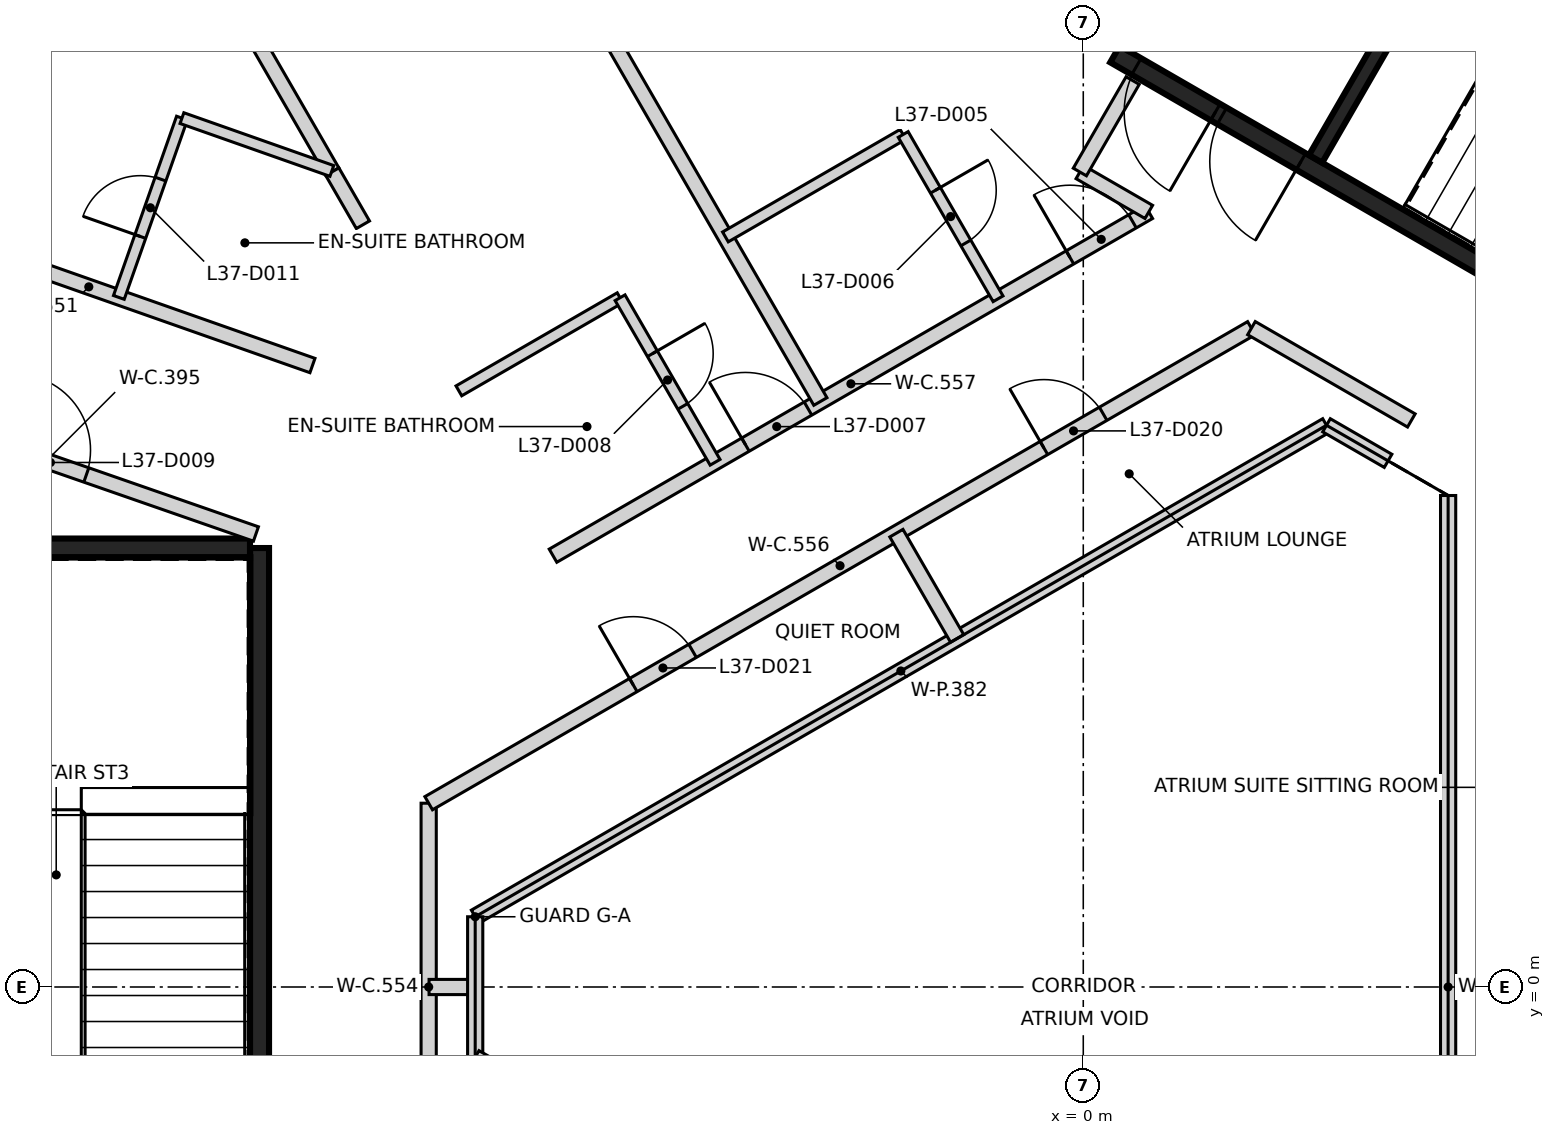
"""IFC4 building model, lengths in metres.
Left out: names, types, materials, properties, quantities, classifications, styles, units other than length and angle.
Written with IfcOpenShell. Run it as: python <this file> out.ifc"""

import sys

from ifc_helpers import new_model, si_unit, direction, frame, frame_2d, origin, place, context, subcontext, project, spatial, rectangle, extrude, element, fill, save


model = new_model("IFC4")
c1 = context("Model", 3, precision=1e-05, world=origin(), true_north=direction((0.0, 1.0)))
c2 = subcontext(c1, "Body", "Model", "MODEL_VIEW")
j1 = project(units=[si_unit("LENGTHUNIT", "METRE"), si_unit("PLANEANGLEUNIT", "RADIAN")], contexts=[c1])
p1 = place(None, origin())
s1 = spatial("IfcSite", under=j1, at=p1, CompositionType="ELEMENT")
p2 = place(p1, origin())
s2 = spatial("IfcBuilding", under=s1, at=p2, CompositionType="ELEMENT")
p3 = place(p2, frame((0.0, 0.0, 150.4)))
s3 = spatial("IfcBuildingStorey", under=s2, at=p3, CompositionType="ELEMENT", Elevation=150.4)
p4 = place(p3, frame((-10.837, 5.775, 0.0), z_axis=(0.0, 0.0, 1.0), x_axis=(0.0, -1.0, 0.0)))
e1 = element("IfcWall", 1, at=p4, inside=s3, PredefinedType="SHEAR", context=c2, shape_type="SweptSolid", body=[
    extrude(rectangle(XDim=11.55, YDim=0.25, at=frame_2d((5.775, 0.0))), origin(), (0.0, 0.0, 1.0), 3.2),
])
p5 = place(p4, frame((10.025, 0.0, 0.0)))
e2 = element("IfcOpeningElement", 2, at=p5, cuts=e1, PredefinedType="OPENING", context=c2, shape_type="SweptSolid", body=[
    extrude(rectangle(XDim=1.2, YDim=2.1, at=frame_2d((0.6, 1.05))), frame((0.0, 0.135, 0.0), z_axis=(0.0, -1.0, 0.0), x_axis=(1.0, 0.0, 0.0)), (0.0, 0.0, 1.0), 0.27),
])
p6 = place(p4, frame((8.725, 0.0, 0.0)))
e3 = element("IfcOpeningElement", 3, at=p6, cuts=e1, PredefinedType="OPENING", context=c2, shape_type="SweptSolid", body=[
    extrude(rectangle(XDim=1.2, YDim=2.1, at=frame_2d((0.6, 1.05))), frame((0.0, 0.135, 0.0), z_axis=(0.0, -1.0, 0.0), x_axis=(1.0, 0.0, 0.0)), (0.0, 0.0, 1.0), 0.27),
])
p7 = place(p3, frame((-16.472, 5.775, 0.0), z_axis=(0.0, 0.0, 1.0), x_axis=(1.0, 0.0, 0.0)))
e4 = element("IfcWall", 4, at=p7, inside=s3, PredefinedType="SHEAR", context=c2, shape_type="SweptSolid", body=[
    extrude(rectangle(XDim=5.51, YDim=0.25, at=frame_2d((2.755, 0.0))), origin(), (0.0, 0.0, 1.0), 3.2),
])
p8 = place(p3, frame((10.42, 6.498, 0.0), z_axis=(0.0, 0.0, 1.0), x_axis=(-0.866021906294, 0.500006057782, 0.0)))
e5 = element("IfcWall", 5, at=p8, inside=s3, PredefinedType="SHEAR", context=c2, shape_type="SweptSolid", body=[
    extrude(rectangle(XDim=11.55, YDim=0.25, at=frame_2d((5.775, 0.0))), origin(), (0.0, 0.0, 1.0), 3.2),
])
p9 = place(p8, frame((10.025, 0.0, 0.0)))
e6 = element("IfcOpeningElement", 6, at=p9, cuts=e5, PredefinedType="OPENING", context=c2, shape_type="SweptSolid", body=[
    extrude(rectangle(XDim=1.2, YDim=2.1, at=frame_2d((0.6, 1.05))), frame((0.0, 0.135, 0.0), z_axis=(0.0, -1.0, 0.0), x_axis=(1.0, 0.0, 0.0)), (0.0, 0.0, 1.0), 0.27),
])
p10 = place(p8, frame((8.725, 0.0, 0.0)))
e7 = element("IfcOpeningElement", 7, at=p10, cuts=e5, PredefinedType="OPENING", context=c2, shape_type="SweptSolid", body=[
    extrude(rectangle(XDim=1.2, YDim=2.1, at=frame_2d((0.6, 1.05))), frame((0.0, 0.135, 0.0), z_axis=(0.0, -1.0, 0.0), x_axis=(1.0, 0.0, 0.0)), (0.0, 0.0, 1.0), 0.27),
])
p11 = place(p3, frame((3.057, 10.895, 0.0), z_axis=(0.0, 0.0, 1.0), x_axis=(0.499989418164, 0.866031513124, 0.0)))
e8 = element("IfcWall", 8, at=p11, inside=s3, PredefinedType="SHEAR", context=c2, shape_type="SweptSolid", body=[
    extrude(rectangle(XDim=5.251, YDim=0.2, at=frame_2d((2.625, 0.0))), origin(), (0.0, 0.0, 1.0), 3.2),
])
p12 = place(p11, frame((1.849, 0.0, 0.0)))
e9 = element("IfcOpeningElement", 9, at=p12, cuts=e8, PredefinedType="OPENING", context=c2, shape_type="SweptSolid", body=[
    extrude(rectangle(XDim=1.4, YDim=2.1, at=frame_2d((0.7, 1.05))), frame((0.0, 0.11, 0.0), z_axis=(0.0, -1.0, 0.0), x_axis=(1.0, 0.0, 0.0)), (0.0, 0.0, 1.0), 0.22),
])
p13 = place(p3, frame((-16.402, 7.879, 0.0), z_axis=(0.0, 0.0, 1.0), x_axis=(0.94449961557, -0.328512520596, 0.0)))
e10 = element("IfcWall", 10, at=p13, inside=s3, PredefinedType="PARTITIONING", context=c2, shape_type="SweptSolid", body=[
    extrude(rectangle(XDim=5.842, YDim=0.2, at=frame_2d((2.921, 0.0))), origin(), (0.0, 0.0, 1.0), 3.2),
])
p14 = place(p13, frame((2.479, 0.0, 0.0)))
e11 = element("IfcOpeningElement", 11, at=p14, cuts=e10, PredefinedType="OPENING", context=c2, shape_type="SweptSolid", body=[
    extrude(rectangle(XDim=1.0, YDim=2.1, at=frame_2d((0.5, 1.05))), frame((0.0, 0.11, 0.0), z_axis=(0.0, -1.0, 0.0), x_axis=(1.0, 0.0, 0.0)), (0.0, 0.0, 1.0), 0.22),
])
p15 = place(p3, frame((-16.026, 10.246, 0.0), z_axis=(0.0, 0.0, 1.0), x_axis=(0.943337348352, -0.331835271187, 0.0)))
e12 = element("IfcWall", 12, at=p15, inside=s3, PredefinedType="PARTITIONING", context=c2, shape_type="SweptSolid", body=[
    extrude(rectangle(XDim=6.238, YDim=0.2, at=frame_2d((3.119, 0.0))), origin(), (0.0, 0.0, 1.0), 3.2),
])
p16 = place(p15, frame((0.2, 0.0, 0.0)))
e13 = element("IfcOpeningElement", 13, at=p16, cuts=e12, PredefinedType="OPENING", context=c2, shape_type="SweptSolid", body=[
    extrude(rectangle(XDim=0.95, YDim=2.1, at=frame_2d((0.475, 1.05))), frame((0.0, 0.11, 0.0), z_axis=(0.0, -1.0, 0.0), x_axis=(1.0, 0.0, 0.0)), (0.0, 0.0, 1.0), 0.22),
])
p17 = place(p3, frame((-8.612, -2.418, 0.0), z_axis=(0.0, 0.0, 1.0), x_axis=(0.0, 1.0, 0.0)))
e14 = element("IfcWall", 14, at=p17, inside=s3, PredefinedType="PARTITIONING", context=c2, shape_type="SweptSolid", body=[
    extrude(rectangle(XDim=4.836, YDim=0.2, at=frame_2d((2.418, 0.0))), origin(), (0.0, 0.0, 1.0), 2.3),
])
p18 = place(p3, frame((-8.612, 2.418, 0.0), z_axis=(0.0, 0.0, 1.0), x_axis=(0.866019033094, 0.500011034197, 0.0)))
e15 = element("IfcWall", 15, at=p18, inside=s3, PredefinedType="PARTITIONING", context=c2, shape_type="SweptSolid", body=[
    extrude(rectangle(XDim=12.498, YDim=0.2, at=frame_2d((6.249, 0.0))), origin(), (0.0, 0.0, 1.0), 3.2),
])
p19 = place(p18, frame((9.346, 0.0, 0.0)))
e16 = element("IfcOpeningElement", 16, at=p19, cuts=e15, PredefinedType="OPENING", context=c2, shape_type="SweptSolid", body=[
    extrude(rectangle(XDim=0.9, YDim=2.1, at=frame_2d((0.45, 1.05))), frame((0.0, 0.11, 0.0), z_axis=(0.0, -1.0, 0.0), x_axis=(1.0, 0.0, 0.0)), (0.0, 0.0, 1.0), 0.22),
])
p20 = place(p18, frame((3.109, 0.0, 0.0)))
e17 = element("IfcOpeningElement", 17, at=p20, cuts=e15, PredefinedType="OPENING", context=c2, shape_type="SweptSolid", body=[
    extrude(rectangle(XDim=0.9, YDim=2.1, at=frame_2d((0.45, 1.05))), frame((0.0, 0.11, 0.0), z_axis=(0.0, -1.0, 0.0), x_axis=(1.0, 0.0, 0.0)), (0.0, 0.0, 1.0), 0.22),
])
p21 = place(p3, frame((-6.976, 5.674, 0.0), z_axis=(0.0, 0.0, 1.0), x_axis=(0.8661469583, 0.499789402276, 0.0)))
e18 = element("IfcWall", 18, at=p21, inside=s3, PredefinedType="PARTITIONING", context=c2, shape_type="SweptSolid", body=[
    extrude(rectangle(XDim=9.05, YDim=0.2, at=frame_2d((4.525, 0.0))), origin(), (0.0, 0.0, 1.0), 3.2),
])
p22 = place(p21, frame((7.852, 0.0, 0.0)))
e19 = element("IfcOpeningElement", 19, at=p22, cuts=e18, PredefinedType="OPENING", context=c2, shape_type="SweptSolid", body=[
    extrude(rectangle(XDim=0.95, YDim=2.1, at=frame_2d((0.475, 1.05))), frame((0.0, 0.11, 0.0), z_axis=(0.0, -1.0, 0.0), x_axis=(1.0, 0.0, 0.0)), (0.0, 0.0, 1.0), 0.22),
])
p23 = place(p21, frame((2.923, 0.0, 0.0)))
e20 = element("IfcOpeningElement", 20, at=p23, cuts=e18, PredefinedType="OPENING", context=c2, shape_type="SweptSolid", body=[
    extrude(rectangle(XDim=0.95, YDim=2.1, at=frame_2d((0.475, 1.05))), frame((0.0, 0.11, 0.0), z_axis=(0.0, -1.0, 0.0), x_axis=(1.0, 0.0, 0.0)), (0.0, 0.0, 1.0), 0.22),
])
p24 = place(p3, frame((-0.045, 10.721, 0.0), z_axis=(0.0, 0.0, 1.0), x_axis=(0.865909943543, -0.500199929702, 0.0)))
e21 = element("IfcWall", 21, at=p24, inside=s3, PredefinedType="PARTITIONING", context=c2, shape_type="SweptSolid", body=[
    extrude(rectangle(XDim=1.047, YDim=0.2, at=frame_2d((0.524, 0.0))), origin(), (0.0, 0.0, 1.0), 3.2),
])
p25 = place(p3, frame((-0.045, 10.722, 0.0), z_axis=(0.0, 0.0, 1.0), x_axis=(0.500107785535, 0.865963164833, 0.0)))
e22 = element("IfcWall", 22, at=p25, inside=s3, PredefinedType="PARTITIONING", context=c2, shape_type="SweptSolid", body=[
    extrude(rectangle(XDim=1.389, YDim=0.2, at=frame_2d((0.695, 0.0))), origin(), (0.0, 0.0, 1.0), 3.2),
])
p26 = place(p3, frame((2.213, 8.668, 0.0), z_axis=(0.0, 0.0, 1.0), x_axis=(0.866001461921, -0.500041466232, 0.0)))
e23 = element("IfcWall", 23, at=p26, inside=s3, PredefinedType="PARTITIONING", context=c2, shape_type="SweptSolid", body=[
    extrude(rectangle(XDim=2.429, YDim=0.2, at=frame_2d((1.214, 0.0))), origin(), (0.0, 0.0, 1.0), 2.3),
])
p27 = place(p3, frame((-13.573, 17.122, 0.0), z_axis=(0.0, 0.0, 1.0), x_axis=(0.49998952864, -0.866031449343, 0.0)))
e24 = element("IfcWall", 24, at=p27, inside=s3, PredefinedType="PARTITIONING", context=c2, shape_type="SweptSolid", body=[
    extrude(rectangle(XDim=7.385, YDim=0.2, at=frame_2d((3.693, 0.0))), origin(), (0.0, 0.0, 1.0), 2.3),
])
p28 = place(p3, frame((-10.071, 19.158, 0.0), z_axis=(0.0, 0.0, 1.0), x_axis=(0.499905140254, -0.866080164158, 0.0)))
e25 = element("IfcWall", 25, at=p28, inside=s3, PredefinedType="PARTITIONING", context=c2, shape_type="SweptSolid", body=[
    extrude(rectangle(XDim=13.227, YDim=0.2, at=frame_2d((6.613, 0.0))), origin(), (0.0, 0.0, 1.0), 2.3),
])
p29 = place(p3, frame((-9.88, 10.726, 0.0), z_axis=(0.0, 0.0, 1.0), x_axis=(0.499626274598, -0.866241066754, 0.0)))
e26 = element("IfcWall", 26, at=p29, inside=s3, PredefinedType="PARTITIONING", context=c2, shape_type="SweptSolid", body=[
    extrude(rectangle(XDim=0.806, YDim=0.2, at=frame_2d((0.403, 0.0))), origin(), (0.0, 0.0, 1.0), 3.2),
])
p30 = place(p3, frame((-8.607, 0.0, 0.0), z_axis=(0.0, 0.0, 1.0), x_axis=(1.0, 0.0, 0.0)))
e27 = element("IfcWall", 27, at=p30, inside=s3, PredefinedType="PARTITIONING", context=c2, shape_type="SweptSolid", body=[
    extrude(rectangle(XDim=0.607, YDim=0.2, at=frame_2d((0.303, 0.0))), origin(), (0.0, 0.0, 1.0), 2.3),
])
p31 = place(p3, frame((-8.0, 0.925, 0.0), z_axis=(0.0, 0.0, 1.0), x_axis=(0.866075250037, 0.499913653818, 0.0)))
e28 = element("IfcWall", 28, at=p31, inside=s3, PredefinedType="PARTITIONING", context=c2, shape_type="SweptSolid", body=[
    extrude(rectangle(XDim=12.932, YDim=0.2, at=frame_2d((6.466, 0.0))), origin(), (0.0, 0.0, 1.0), 2.3),
])
p32 = place(p3, frame((-8.0, -0.924, 0.0), z_axis=(0.0, 0.0, 1.0), x_axis=(0.0, 1.0, 0.0)))
e29 = element("IfcWall", 29, at=p32, inside=s3, PredefinedType="PARTITIONING", context=c2, shape_type="SweptSolid", body=[
    extrude(rectangle(XDim=1.848, YDim=0.2, at=frame_2d((0.924, 0.0))), origin(), (0.0, 0.0, 1.0), 2.3),
])
p33 = place(p3, frame((-8.0, -0.924, 0.0), z_axis=(0.0, 0.0, 1.0), x_axis=(0.866062358179, -0.499935987647, 0.0)))
e30 = element("IfcWall", 30, at=p33, inside=s3, PredefinedType="PARTITIONING", context=c2, shape_type="SweptSolid", body=[
    extrude(rectangle(XDim=12.932, YDim=0.2, at=frame_2d((6.466, 0.0))), origin(), (0.0, 0.0, 1.0), 2.3),
])
p34 = place(p3, frame((-2.459, 5.97, 0.0), z_axis=(0.0, 0.0, 1.0), x_axis=(0.499898632315, -0.866083920535, 0.0)))
e31 = element("IfcWall", 31, at=p34, inside=s3, PredefinedType="PARTITIONING", context=c2, shape_type="SweptSolid", body=[
    extrude(rectangle(XDim=1.599, YDim=0.2, at=frame_2d((0.8, 0.0))), origin(), (0.0, 0.0, 1.0), 3.2),
])
p35 = place(p3, frame((3.2, 7.39, 0.0), z_axis=(0.0, 0.0, 1.0), x_axis=(0.865985641702, -0.500068863623, 0.0)))
e32 = element("IfcWall", 32, at=p35, inside=s3, PredefinedType="PARTITIONING", context=c2, shape_type="SweptSolid", body=[
    extrude(rectangle(XDim=0.935, YDim=0.2, at=frame_2d((0.468, 0.0))), origin(), (0.0, 0.0, 1.0), 2.3),
])
p36 = place(p3, frame((4.8, -6.466, 0.0), z_axis=(0.0, 0.0, 1.0), x_axis=(0.0, 1.0, 0.0)))
e33 = element("IfcWall", 33, at=p36, inside=s3, PredefinedType="PARTITIONING", context=c2, shape_type="SweptSolid", body=[
    extrude(rectangle(XDim=12.932, YDim=0.2, at=frame_2d((6.466, 0.0))), origin(), (0.0, 0.0, 1.0), 2.3),
])
p37 = place(p3, frame((-12.688, 9.072, 0.0), z_axis=(0.0, 0.0, 1.0), x_axis=(0.331941604797, 0.943299936926, 0.0)))
e34 = element("IfcWall", 34, at=p37, inside=s3, PredefinedType="PARTITIONING", context=c2, shape_type="SweptSolid", body=[
    extrude(rectangle(XDim=2.501, YDim=0.15, at=frame_2d((1.25, 0.0))), origin(), (0.0, 0.0, 1.0), 3.2),
])
p38 = place(p37, frame((0.85, 0.0, 0.0)))
e35 = element("IfcOpeningElement", 35, at=p38, cuts=e34, PredefinedType="OPENING", context=c2, shape_type="SweptSolid", body=[
    extrude(rectangle(XDim=0.8, YDim=2.1, at=frame_2d((0.4, 1.05))), frame((0.0, 0.085, 0.0), z_axis=(0.0, -1.0, 0.0), x_axis=(1.0, 0.0, 0.0)), (0.0, 0.0, 1.0), 0.17),
])
p39 = place(p3, frame((-11.858, 11.431, 0.0), z_axis=(0.0, 0.0, 1.0), x_axis=(0.943162669368, -0.332331429617, 0.0)))
e36 = element("IfcWall", 36, at=p39, inside=s3, PredefinedType="PARTITIONING", context=c2, shape_type="SweptSolid", body=[
    extrude(rectangle(XDim=2.091, YDim=0.15, at=frame_2d((1.045, 0.0))), origin(), (0.0, 0.0, 1.0), 3.2),
])
p40 = place(p3, frame((-8.215, 7.843, 0.0), z_axis=(0.0, 0.0, 1.0), x_axis=(0.865983065851, 0.500073324283, 0.0)))
e37 = element("IfcWall", 37, at=p40, inside=s3, PredefinedType="PARTITIONING", context=c2, shape_type="SweptSolid", body=[
    extrude(rectangle(XDim=2.449, YDim=0.15, at=frame_2d((1.225, 0.0))), origin(), (0.0, 0.0, 1.0), 3.2),
])
p41 = place(p3, frame((-6.094, 9.068, 0.0), z_axis=(0.0, 0.0, 1.0), x_axis=(0.500004234368, -0.866022959057, 0.0)))
e38 = element("IfcWall", 38, at=p41, inside=s3, PredefinedType="PARTITIONING", context=c2, shape_type="SweptSolid", body=[
    extrude(rectangle(XDim=2.5, YDim=0.15, at=frame_2d((1.25, 0.0))), origin(), (0.0, 0.0, 1.0), 3.2),
])
p42 = place(p41, frame((0.85, 0.0, 0.0)))
e39 = element("IfcOpeningElement", 39, at=p42, cuts=e38, PredefinedType="OPENING", context=c2, shape_type="SweptSolid", body=[
    extrude(rectangle(XDim=0.8, YDim=2.1, at=frame_2d((0.4, 1.05))), frame((0.0, 0.085, 0.0), z_axis=(0.0, -1.0, 0.0), x_axis=(1.0, 0.0, 0.0)), (0.0, 0.0, 1.0), 0.17),
])
p43 = place(p3, frame((-4.708, 9.868, 0.0), z_axis=(0.0, 0.0, 1.0), x_axis=(0.865950438779, 0.500129820725, 0.0)))
e40 = element("IfcWall", 40, at=p43, inside=s3, PredefinedType="PARTITIONING", context=c2, shape_type="SweptSolid", body=[
    extrude(rectangle(XDim=2.698, YDim=0.15, at=frame_2d((1.349, 0.0))), origin(), (0.0, 0.0, 1.0), 3.2),
])
p44 = place(p3, frame((-2.369, 11.216, 0.0), z_axis=(0.0, 0.0, 1.0), x_axis=(0.499852268047, -0.866110680068, 0.0)))
e41 = element("IfcWall", 41, at=p44, inside=s3, PredefinedType="PARTITIONING", context=c2, shape_type="SweptSolid", body=[
    extrude(rectangle(XDim=2.496, YDim=0.15, at=frame_2d((1.248, 0.0))), origin(), (0.0, 0.0, 1.0), 3.2),
])
p45 = place(p44, frame((0.848, 0.0, 0.0)))
e42 = element("IfcOpeningElement", 42, at=p45, cuts=e41, PredefinedType="OPENING", context=c2, shape_type="SweptSolid", body=[
    extrude(rectangle(XDim=0.8, YDim=2.1, at=frame_2d((0.4, 1.05))), frame((0.0, 0.085, 0.0), z_axis=(0.0, -1.0, 0.0), x_axis=(1.0, 0.0, 0.0)), (0.0, 0.0, 1.0), 0.17),
])
p46 = place(p9, origin())
e43 = element("IfcDoor", 43, at=p46, inside=s3, OperationType="SINGLE_SWING_LEFT", PredefinedType="DOOR", context=c2, shape_type="SweptSolid", body=[
    extrude(rectangle(XDim=1.2, YDim=2.1, at=frame_2d((0.6, 1.05))), frame((0.0, 0.025, 0.0), z_axis=(0.0, -1.0, 0.0), x_axis=(1.0, 0.0, 0.0)), (0.0, 0.0, 1.0), 0.05),
])
fill(e6, e43)
p47 = place(p10, origin())
e44 = element("IfcDoor", 44, at=p47, inside=s3, OperationType="SINGLE_SWING_RIGHT", PredefinedType="DOOR", context=c2, shape_type="SweptSolid", body=[
    extrude(rectangle(XDim=1.2, YDim=2.1, at=frame_2d((0.6, 1.05))), frame((0.0, 0.025, 0.0), z_axis=(0.0, -1.0, 0.0), x_axis=(1.0, 0.0, 0.0)), (0.0, 0.0, 1.0), 0.05),
])
fill(e7, e44)
p48 = place(p22, origin())
e45 = element("IfcDoor", 45, at=p48, inside=s3, OperationType="SINGLE_SWING_LEFT", PredefinedType="DOOR", context=c2, shape_type="SweptSolid", body=[
    extrude(rectangle(XDim=0.95, YDim=2.1, at=frame_2d((0.475, 1.05))), frame((0.0, 0.025, 0.0), z_axis=(0.0, -1.0, 0.0), x_axis=(1.0, 0.0, 0.0)), (0.0, 0.0, 1.0), 0.05),
])
fill(e19, e45)
p49 = place(p45, origin())
e46 = element("IfcDoor", 46, at=p49, inside=s3, OperationType="SINGLE_SWING_LEFT", PredefinedType="DOOR", context=c2, shape_type="SweptSolid", body=[
    extrude(rectangle(XDim=0.8, YDim=2.1, at=frame_2d((0.4, 1.05))), frame((0.0, 0.025, 0.0), z_axis=(0.0, -1.0, 0.0), x_axis=(1.0, 0.0, 0.0)), (0.0, 0.0, 1.0), 0.05),
])
fill(e42, e46)
p50 = place(p23, origin())
e47 = element("IfcDoor", 47, at=p50, inside=s3, OperationType="SINGLE_SWING_LEFT", PredefinedType="DOOR", context=c2, shape_type="SweptSolid", body=[
    extrude(rectangle(XDim=0.95, YDim=2.1, at=frame_2d((0.475, 1.05))), frame((0.0, 0.025, 0.0), z_axis=(0.0, -1.0, 0.0), x_axis=(1.0, 0.0, 0.0)), (0.0, 0.0, 1.0), 0.05),
])
fill(e20, e47)
p51 = place(p42, frame((0.8, 0.0, 0.0), z_axis=(0.0, 0.0, 1.0), x_axis=(-1.0, 0.0, 0.0)))
e48 = element("IfcDoor", 48, at=p51, inside=s3, OperationType="SINGLE_SWING_LEFT", PredefinedType="DOOR", context=c2, shape_type="SweptSolid", body=[
    extrude(rectangle(XDim=0.8, YDim=2.1, at=frame_2d((0.4, 1.05))), frame((0.0, 0.025, 0.0), z_axis=(0.0, -1.0, 0.0), x_axis=(1.0, 0.0, 0.0)), (0.0, 0.0, 1.0), 0.05),
])
fill(e39, e48)
p52 = place(p14, frame((1.0, 0.0, 0.0), z_axis=(0.0, 0.0, 1.0), x_axis=(-1.0, 0.0, 0.0)))
e49 = element("IfcDoor", 49, at=p52, inside=s3, OperationType="SINGLE_SWING_LEFT", PredefinedType="DOOR", context=c2, shape_type="SweptSolid", body=[
    extrude(rectangle(XDim=1.0, YDim=2.1, at=frame_2d((0.5, 1.05))), frame((0.0, 0.025, 0.0), z_axis=(0.0, -1.0, 0.0), x_axis=(1.0, 0.0, 0.0)), (0.0, 0.0, 1.0), 0.05),
])
fill(e11, e49)
p53 = place(p38, origin())
e50 = element("IfcDoor", 50, at=p53, inside=s3, OperationType="SINGLE_SWING_LEFT", PredefinedType="DOOR", context=c2, shape_type="SweptSolid", body=[
    extrude(rectangle(XDim=0.8, YDim=2.1, at=frame_2d((0.4, 1.05))), frame((0.0, 0.025, 0.0), z_axis=(0.0, -1.0, 0.0), x_axis=(1.0, 0.0, 0.0)), (0.0, 0.0, 1.0), 0.05),
])
fill(e35, e50)
p54 = place(p19, frame((0.9, 0.0, 0.0), z_axis=(0.0, 0.0, 1.0), x_axis=(-1.0, 0.0, 0.0)))
e51 = element("IfcDoor", 51, at=p54, inside=s3, OperationType="SINGLE_SWING_LEFT", PredefinedType="DOOR", context=c2, shape_type="SweptSolid", body=[
    extrude(rectangle(XDim=0.9, YDim=2.1, at=frame_2d((0.45, 1.05))), frame((0.0, 0.025, 0.0), z_axis=(0.0, -1.0, 0.0), x_axis=(1.0, 0.0, 0.0)), (0.0, 0.0, 1.0), 0.05),
])
fill(e16, e51)
p55 = place(p20, frame((0.9, 0.0, 0.0), z_axis=(0.0, 0.0, 1.0), x_axis=(-1.0, 0.0, 0.0)))
e52 = element("IfcDoor", 52, at=p55, inside=s3, OperationType="SINGLE_SWING_LEFT", PredefinedType="DOOR", context=c2, shape_type="SweptSolid", body=[
    extrude(rectangle(XDim=0.9, YDim=2.1, at=frame_2d((0.45, 1.05))), frame((0.0, 0.025, 0.0), z_axis=(0.0, -1.0, 0.0), x_axis=(1.0, 0.0, 0.0)), (0.0, 0.0, 1.0), 0.05),
])
fill(e17, e52)
save(model, sys.argv[1])
